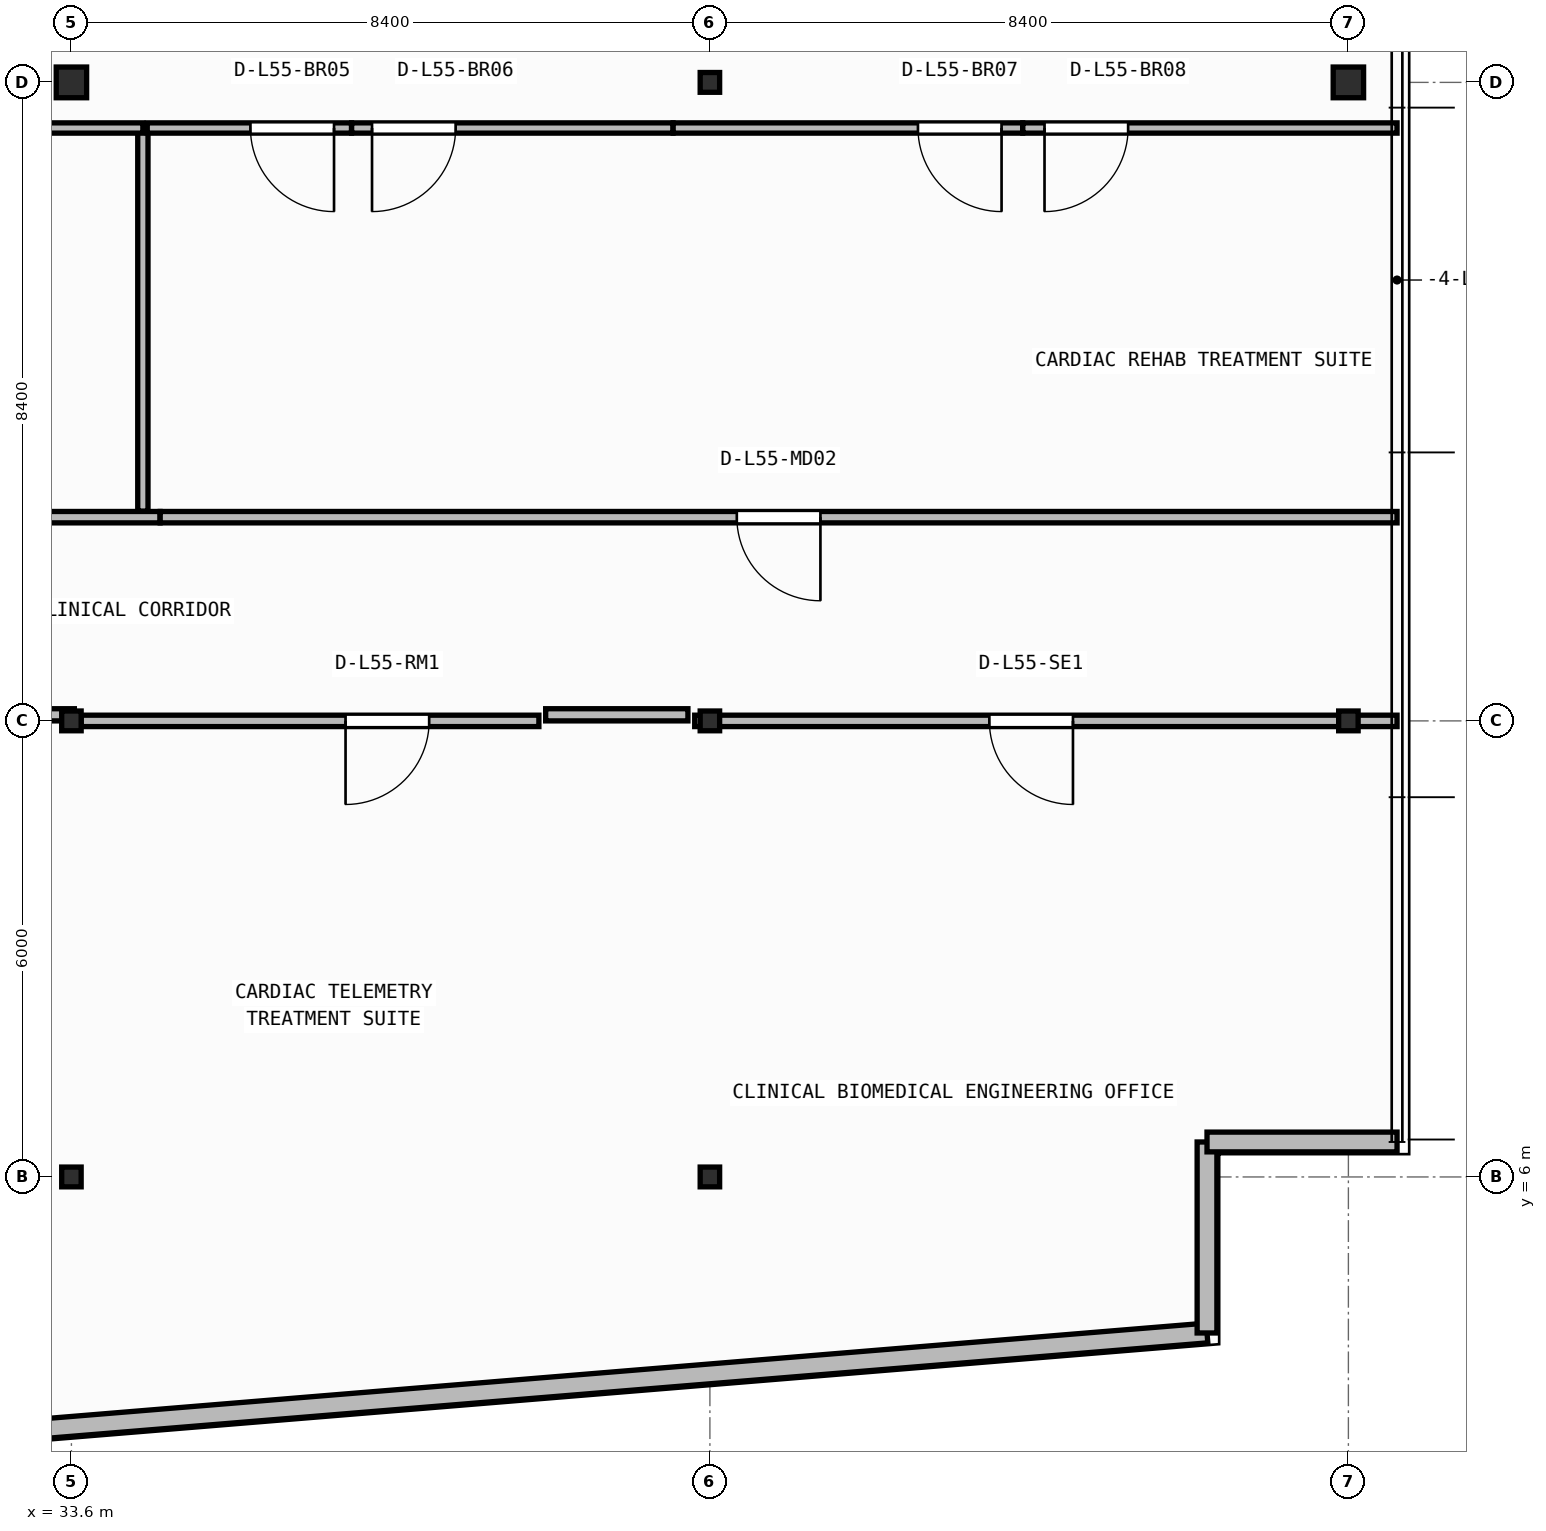
"""IFC4 building model, lengths in metres.
Left out: names, types, materials, properties, quantities, classifications, styles, units other than length and angle.
Written with IfcOpenShell. Run it as: python <this file> out.ifc"""

import sys

from ifc_helpers import new_model, si_unit, direction, frame, frame_2d, origin, origin_2d, place, context, subcontext, project, spatial, rectangle, i_section, extrude, element, fill, save


model = new_model("IFC4")
c1 = context("Model", 3, precision=1e-05, world=origin(), true_north=direction((0.0, 1.0)))
c2 = subcontext(c1, "Body", "Model", "MODEL_VIEW")
j1 = project(units=[si_unit("LENGTHUNIT", "METRE"), si_unit("PLANEANGLEUNIT", "RADIAN")], contexts=[c1])
p1 = place(None, origin())
s1 = spatial("IfcSite", under=j1, at=p1, CompositionType="ELEMENT")
p2 = place(p1, origin())
s2 = spatial("IfcBuilding", under=s1, at=p2, CompositionType="ELEMENT")
p3 = place(p2, frame((0.0, 0.0, 223.7)))
s3 = spatial("IfcBuildingStorey", under=s2, at=p3, CompositionType="ELEMENT", Elevation=223.7)
for number, where, z_axis, x_axis in (
    (1, (33.6, 6.0, 0.0), (0.0, 0.0, 1.0), (1.0, 0.0, 0.0)),
    (2, (42.0, 6.0, 0.0), (0.0, 0.0, 1.0), (1.0, 0.0, 0.0)),
    (3, (33.6, 12.0, 0.0), (0.0, 0.0, 1.0), (1.0, 0.0, 0.0)),
    (4, (42.0, 12.0, 0.0), (0.0, 0.0, 1.0), (1.0, 0.0, 0.0)),
    (5, (50.4, 12.0, 0.0), (0.0, 0.0, 1.0), (1.0, 0.0, 0.0)),
):
    element("IfcColumn", number, at=place(p3, frame(where, z_axis=z_axis, x_axis=x_axis)), inside=s3, PredefinedType="COLUMN", context=c2, shape_type="SweptSolid", body=[
        extrude(i_section(OverallWidth=0.256, OverallDepth=0.26, WebThickness=0.01, FlangeThickness=0.017, FilletRadius=0.013, at=origin_2d()), origin(), (0.0, 0.0, 1.0), 3.95),
    ])
p4 = place(p3, frame((33.6, 20.4, 0.0), z_axis=(0.0, 0.0, 1.0), x_axis=(1.0, 0.0, 0.0)))
e6 = element("IfcColumn", 6, at=p4, inside=s3, PredefinedType="COLUMN", context=c2, shape_type="SweptSolid", body=[
    extrude(i_section(OverallWidth=0.4, OverallDepth=0.404, WebThickness=0.02, FlangeThickness=0.032, at=origin_2d()), origin(), (0.0, 0.0, 1.0), 3.95),
])
p5 = place(p3, frame((42.0, 20.4, 0.0), z_axis=(0.0, 0.0, 1.0), x_axis=(1.0, 0.0, 0.0)))
e7 = element("IfcColumn", 7, at=p5, inside=s3, PredefinedType="COLUMN", context=c2, shape_type="SweptSolid", body=[
    extrude(i_section(OverallWidth=0.256, OverallDepth=0.26, WebThickness=0.01, FlangeThickness=0.017, FilletRadius=0.013, at=origin_2d()), origin(), (0.0, 0.0, 1.0), 3.95),
])
p6 = place(p3, frame((50.4, 20.4, 0.0), z_axis=(0.0, 0.0, 1.0), x_axis=(1.0, 0.0, 0.0)))
e8 = element("IfcColumn", 8, at=p6, inside=s3, PredefinedType="COLUMN", context=c2, shape_type="SweptSolid", body=[
    extrude(i_section(OverallWidth=0.4, OverallDepth=0.404, WebThickness=0.02, FlangeThickness=0.032, at=origin_2d()), origin(), (0.0, 0.0, 1.0), 3.95),
])
p7 = place(p3, frame((2.66, 0.174, 0.0), z_axis=(0.0, 0.0, 1.0), x_axis=(0.996634028439, 0.081979347142, 0.0)))
e9 = element("IfcWall", 9, at=p7, inside=s3, PredefinedType="STANDARD", context=c2, shape_type="SweptSolid", body=[
    extrude(rectangle(XDim=46.035, YDim=0.26, at=frame_2d((23.018, 0.0))), origin(), (0.0, 0.0, 1.0), 3.71),
])
p8 = place(p7, frame((21.817, 0.0, 0.9)))
e10 = element("IfcOpeningElement", 10, at=p8, cuts=e9, PredefinedType="OPENING", context=c2, shape_type="SweptSolid", body=[
    extrude(rectangle(XDim=2.4, YDim=1.65, at=frame_2d((1.2, 0.825))), frame((0.0, 0.14, 0.0), z_axis=(0.0, -1.0, 0.0), x_axis=(1.0, 0.0, 0.0)), (0.0, 0.0, 1.0), 0.28),
])
p9 = place(p3, frame((48.54, 3.948, 0.0), z_axis=(0.0, 0.0, 1.0), x_axis=(0.0, 1.0, 0.0)))
e11 = element("IfcWall", 11, at=p9, inside=s3, PredefinedType="STANDARD", context=c2, shape_type="SweptSolid", body=[
    extrude(rectangle(XDim=2.512, YDim=0.26, at=frame_2d((1.256, 0.0))), origin(), (0.0, 0.0, 1.0), 3.71),
])
p10 = place(p3, frame((48.54, 6.46, 0.0), z_axis=(0.0, 0.0, 1.0), x_axis=(1.0, 0.0, 0.0)))
e12 = element("IfcWall", 12, at=p10, inside=s3, PredefinedType="STANDARD", context=c2, shape_type="SweptSolid", body=[
    extrude(rectangle(XDim=2.5, YDim=0.26, at=frame_2d((1.25, 0.0))), origin(), (0.0, 0.0, 1.0), 3.71),
])
p11 = place(p3, frame((39.75, 12.0, 0.0), z_axis=(0.0, 0.0, 1.0), x_axis=(-1.0, 0.0, 0.0)))
e13 = element("IfcWall", 13, at=p11, inside=s3, PredefinedType="PARTITIONING", context=c2, shape_type="SweptSolid", body=[
    extrude(rectangle(XDim=6.022, YDim=0.15, at=frame_2d((3.011, 0.0))), origin(), (0.0, 0.0, 1.0), 3.152),
])
p12 = place(p11, frame((1.444, 0.0, 0.0)))
e14 = element("IfcOpeningElement", 14, at=p12, cuts=e13, PredefinedType="OPENING", context=c2, shape_type="SweptSolid", body=[
    extrude(rectangle(XDim=1.1, YDim=2.1, at=frame_2d((0.55, 1.05))), frame((0.0, 0.085, 0.0), z_axis=(0.0, -1.0, 0.0), x_axis=(1.0, 0.0, 0.0)), (0.0, 0.0, 1.0), 0.17),
])
p13 = place(p3, frame((51.04, 12.0, 0.0), z_axis=(0.0, 0.0, 1.0), x_axis=(-1.0, 0.0, 0.0)))
e15 = element("IfcWall", 15, at=p13, inside=s3, PredefinedType="PARTITIONING", context=c2, shape_type="SweptSolid", body=[
    extrude(rectangle(XDim=9.24, YDim=0.15, at=frame_2d((4.62, 0.0))), origin(), (0.0, 0.0, 1.0), 3.152),
])
p14 = place(p13, frame((4.263, 0.0, 0.0)))
e16 = element("IfcOpeningElement", 16, at=p14, cuts=e15, PredefinedType="OPENING", context=c2, shape_type="SweptSolid", body=[
    extrude(rectangle(XDim=1.1, YDim=2.1, at=frame_2d((0.55, 1.05))), frame((0.0, 0.085, 0.0), z_axis=(0.0, -1.0, 0.0), x_axis=(1.0, 0.0, 0.0)), (0.0, 0.0, 1.0), 0.17),
])
p15 = place(p3, frame((34.766, 14.68, 0.0), z_axis=(0.0, 0.0, 1.0), x_axis=(-1.0, 0.0, 0.0)))
e17 = element("IfcWall", 17, at=p15, inside=s3, PredefinedType="PARTITIONING", context=c2, shape_type="SweptSolid", body=[
    extrude(rectangle(XDim=21.212, YDim=0.15, at=frame_2d((10.606, 0.0))), origin(), (0.0, 0.0, 1.0), 3.71),
])
p16 = place(p15, frame((10.056, 0.0, 0.0)))
e18 = element("IfcOpeningElement", 18, at=p16, cuts=e17, PredefinedType="OPENING", context=c2, shape_type="SweptSolid", body=[
    extrude(rectangle(XDim=1.1, YDim=2.1, at=frame_2d((0.55, 1.05))), frame((0.0, 0.085, 0.0), z_axis=(0.0, -1.0, 0.0), x_axis=(1.0, 0.0, 0.0)), (0.0, 0.0, 1.0), 0.17),
])
p17 = place(p3, frame((51.04, 14.68, 0.0), z_axis=(0.0, 0.0, 1.0), x_axis=(-1.0, 0.0, 0.0)))
e19 = element("IfcWall", 19, at=p17, inside=s3, PredefinedType="PARTITIONING", context=c2, shape_type="SweptSolid", body=[
    extrude(rectangle(XDim=16.272, YDim=0.15, at=frame_2d((8.136, 0.0))), origin(), (0.0, 0.0, 1.0), 3.71),
])
p18 = place(p17, frame((7.586, 0.0, 0.0)))
e20 = element("IfcOpeningElement", 20, at=p18, cuts=e19, PredefinedType="OPENING", context=c2, shape_type="SweptSolid", body=[
    extrude(rectangle(XDim=1.1, YDim=2.1, at=frame_2d((0.55, 1.05))), frame((0.0, 0.085, 0.0), z_axis=(0.0, -1.0, 0.0), x_axis=(1.0, 0.0, 0.0)), (0.0, 0.0, 1.0), 0.17),
])
p19 = place(p3, frame((34.54, 14.76, 0.0), z_axis=(0.0, 0.0, 1.0), x_axis=(0.0, 1.0, 0.0)))
e21 = element("IfcWall", 21, at=p19, inside=s3, PredefinedType="PARTITIONING", context=c2, shape_type="SweptSolid", body=[
    extrude(rectangle(XDim=5.04, YDim=0.135, at=frame_2d((2.52, 0.0))), origin(), (0.0, 0.0, 1.0), 3.71),
])
p20 = place(p3, frame((34.54, 19.8, 0.0), z_axis=(0.0, 0.0, 1.0), x_axis=(-1.0, 0.0, 0.0)))
e22 = element("IfcWall", 22, at=p20, inside=s3, PredefinedType="PARTITIONING", context=c2, shape_type="SweptSolid", body=[
    extrude(rectangle(XDim=2.223, YDim=0.135, at=frame_2d((1.112, 0.0))), origin(), (0.0, 0.0, 1.0), 3.71),
])
p21 = place(p3, frame((37.285, 19.8, 0.0), z_axis=(0.0, 0.0, 1.0), x_axis=(-1.0, 0.0, 0.0)))
e23 = element("IfcWall", 23, at=p21, inside=s3, PredefinedType="PARTITIONING", context=c2, shape_type="SweptSolid", body=[
    extrude(rectangle(XDim=2.687, YDim=0.135, at=frame_2d((1.344, 0.0))), origin(), (0.0, 0.0, 1.0), 3.71),
])
p22 = place(p21, frame((0.23, 0.0, 0.0)))
e24 = element("IfcOpeningElement", 24, at=p22, cuts=e23, PredefinedType="OPENING", context=c2, shape_type="SweptSolid", body=[
    extrude(rectangle(XDim=1.1, YDim=2.1, at=frame_2d((0.55, 1.05))), frame((0.0, 0.077, 0.0), z_axis=(0.0, -1.0, 0.0), x_axis=(1.0, 0.0, 0.0)), (0.0, 0.0, 1.0), 0.155),
])
p23 = place(p3, frame((41.515, 19.8, 0.0), z_axis=(0.0, 0.0, 1.0), x_axis=(-1.0, 0.0, 0.0)))
e25 = element("IfcWall", 25, at=p23, inside=s3, PredefinedType="PARTITIONING", context=c2, shape_type="SweptSolid", body=[
    extrude(rectangle(XDim=4.228, YDim=0.135, at=frame_2d((2.114, 0.0))), origin(), (0.0, 0.0, 1.0), 3.71),
])
p24 = place(p23, frame((2.86, 0.0, 0.0)))
e26 = element("IfcOpeningElement", 26, at=p24, cuts=e25, PredefinedType="OPENING", context=c2, shape_type="SweptSolid", body=[
    extrude(rectangle(XDim=1.1, YDim=2.1, at=frame_2d((0.55, 1.05))), frame((0.0, 0.077, 0.0), z_axis=(0.0, -1.0, 0.0), x_axis=(1.0, 0.0, 0.0)), (0.0, 0.0, 1.0), 0.155),
])
p25 = place(p3, frame((46.115, 19.8, 0.0), z_axis=(0.0, 0.0, 1.0), x_axis=(-1.0, 0.0, 0.0)))
e27 = element("IfcWall", 27, at=p25, inside=s3, PredefinedType="PARTITIONING", context=c2, shape_type="SweptSolid", body=[
    extrude(rectangle(XDim=4.598, YDim=0.135, at=frame_2d((2.299, 0.0))), origin(), (0.0, 0.0, 1.0), 3.71),
])
p26 = place(p25, frame((0.278, 0.0, 0.0)))
e28 = element("IfcOpeningElement", 28, at=p26, cuts=e27, PredefinedType="OPENING", context=c2, shape_type="SweptSolid", body=[
    extrude(rectangle(XDim=1.1, YDim=2.1, at=frame_2d((0.55, 1.05))), frame((0.0, 0.077, 0.0), z_axis=(0.0, -1.0, 0.0), x_axis=(1.0, 0.0, 0.0)), (0.0, 0.0, 1.0), 0.155),
])
p27 = place(p3, frame((51.04, 19.8, 0.0), z_axis=(0.0, 0.0, 1.0), x_axis=(-1.0, 0.0, 0.0)))
e29 = element("IfcWall", 29, at=p27, inside=s3, PredefinedType="PARTITIONING", context=c2, shape_type="SweptSolid", body=[
    extrude(rectangle(XDim=4.923, YDim=0.135, at=frame_2d((2.462, 0.0))), origin(), (0.0, 0.0, 1.0), 3.71),
])
p28 = place(p27, frame((3.538, 0.0, 0.0)))
e30 = element("IfcOpeningElement", 30, at=p28, cuts=e29, PredefinedType="OPENING", context=c2, shape_type="SweptSolid", body=[
    extrude(rectangle(XDim=1.1, YDim=2.1, at=frame_2d((0.55, 1.05))), frame((0.0, 0.077, 0.0), z_axis=(0.0, -1.0, 0.0), x_axis=(1.0, 0.0, 0.0)), (0.0, 0.0, 1.0), 0.155),
])
p29 = place(p3, frame((31.439, 12.08, 0.0), z_axis=(0.0, 0.0, 1.0), x_axis=(1.0, 0.0, 0.0)))
e31 = element("IfcWall", 31, at=p29, inside=s3, PredefinedType="PARTITIONING", context=c2, shape_type="SweptSolid", body=[
    extrude(rectangle(XDim=2.199, YDim=0.16, at=frame_2d((1.1, 0.0))), origin(), (0.0, 0.0, 1.0), 3.152),
])
p30 = place(p3, frame((39.839, 12.08, 0.0), z_axis=(0.0, 0.0, 1.0), x_axis=(1.0, 0.0, 0.0)))
e32 = element("IfcWall", 32, at=p30, inside=s3, PredefinedType="PARTITIONING", context=c2, shape_type="SweptSolid", body=[
    extrude(rectangle(XDim=1.871, YDim=0.16, at=frame_2d((0.936, 0.0))), origin(), (0.0, 0.0, 1.0), 3.152),
])
p31 = place(p12, origin())
e33 = element("IfcDoor", 33, at=p31, inside=s3, OperationType="SINGLE_SWING_RIGHT", PredefinedType="DOOR", context=c2, shape_type="SweptSolid", body=[
    extrude(rectangle(XDim=1.1, YDim=2.1, at=frame_2d((0.55, 1.05))), frame((0.0, 0.025, 0.0), z_axis=(0.0, -1.0, 0.0), x_axis=(1.0, 0.0, 0.0)), (0.0, 0.0, 1.0), 0.05),
])
fill(e14, e33)
p32 = place(p14, origin())
e34 = element("IfcDoor", 34, at=p32, inside=s3, OperationType="SINGLE_SWING_LEFT", PredefinedType="DOOR", context=c2, shape_type="SweptSolid", body=[
    extrude(rectangle(XDim=1.1, YDim=2.1, at=frame_2d((0.55, 1.05))), frame((0.0, 0.025, 0.0), z_axis=(0.0, -1.0, 0.0), x_axis=(1.0, 0.0, 0.0)), (0.0, 0.0, 1.0), 0.05),
])
fill(e16, e34)
p33 = place(p18, origin())
e35 = element("IfcDoor", 35, at=p33, inside=s3, OperationType="SINGLE_SWING_LEFT", PredefinedType="DOOR", context=c2, shape_type="SweptSolid", body=[
    extrude(rectangle(XDim=1.1, YDim=2.1, at=frame_2d((0.55, 1.05))), frame((0.0, 0.025, 0.0), z_axis=(0.0, -1.0, 0.0), x_axis=(1.0, 0.0, 0.0)), (0.0, 0.0, 1.0), 0.05),
])
fill(e20, e35)
p34 = place(p22, origin())
e36 = element("IfcDoor", 36, at=p34, inside=s3, OperationType="SINGLE_SWING_LEFT", PredefinedType="DOOR", context=c2, shape_type="SweptSolid", body=[
    extrude(rectangle(XDim=1.1, YDim=2.1, at=frame_2d((0.55, 1.05))), frame((0.0, 0.025, 0.0), z_axis=(0.0, -1.0, 0.0), x_axis=(1.0, 0.0, 0.0)), (0.0, 0.0, 1.0), 0.05),
])
fill(e24, e36)
p35 = place(p24, origin())
e37 = element("IfcDoor", 37, at=p35, inside=s3, OperationType="SINGLE_SWING_RIGHT", PredefinedType="DOOR", context=c2, shape_type="SweptSolid", body=[
    extrude(rectangle(XDim=1.1, YDim=2.1, at=frame_2d((0.55, 1.05))), frame((0.0, 0.025, 0.0), z_axis=(0.0, -1.0, 0.0), x_axis=(1.0, 0.0, 0.0)), (0.0, 0.0, 1.0), 0.05),
])
fill(e26, e37)
p36 = place(p26, origin())
e38 = element("IfcDoor", 38, at=p36, inside=s3, OperationType="SINGLE_SWING_LEFT", PredefinedType="DOOR", context=c2, shape_type="SweptSolid", body=[
    extrude(rectangle(XDim=1.1, YDim=2.1, at=frame_2d((0.55, 1.05))), frame((0.0, 0.025, 0.0), z_axis=(0.0, -1.0, 0.0), x_axis=(1.0, 0.0, 0.0)), (0.0, 0.0, 1.0), 0.05),
])
fill(e28, e38)
p37 = place(p28, origin())
e39 = element("IfcDoor", 39, at=p37, inside=s3, OperationType="SINGLE_SWING_RIGHT", PredefinedType="DOOR", context=c2, shape_type="SweptSolid", body=[
    extrude(rectangle(XDim=1.1, YDim=2.1, at=frame_2d((0.55, 1.05))), frame((0.0, 0.025, 0.0), z_axis=(0.0, -1.0, 0.0), x_axis=(1.0, 0.0, 0.0)), (0.0, 0.0, 1.0), 0.05),
])
fill(e30, e39)
save(model, sys.argv[1])
